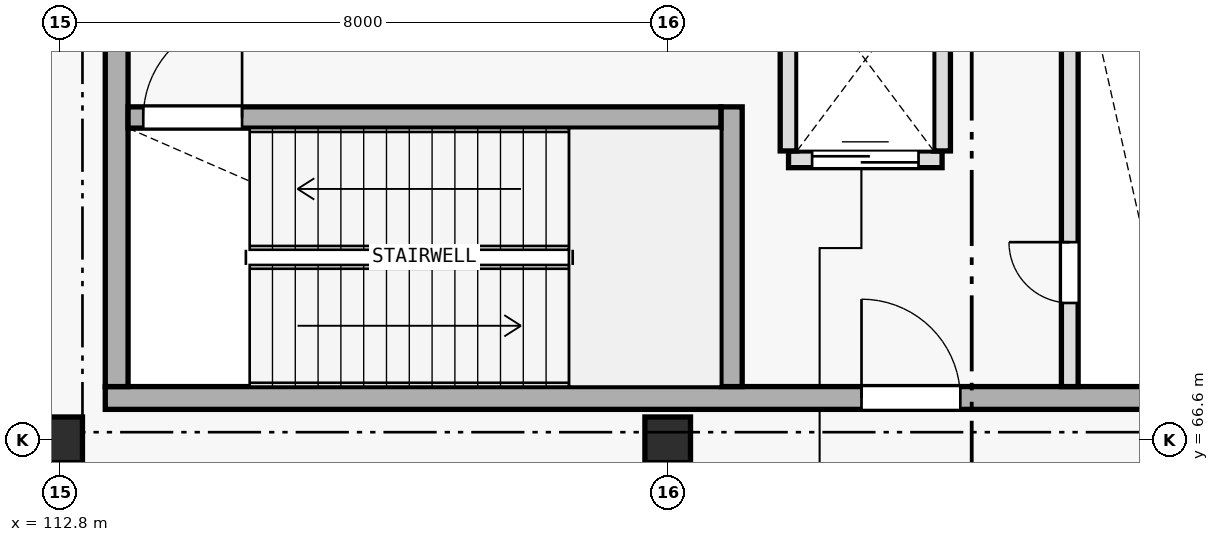
"""IFC4 building model, lengths in metres.
Left out: names, types, materials, properties, quantities, classifications, styles, units other than length and angle.
Written with IfcOpenShell. Run it as: python <this file> out.ifc"""

import sys

from ifc_helpers import new_model, si_unit, direction, frame, frame_2d, origin, origin_2d, place, context, subcontext, project, spatial, rectangle, extrude, element, fill, save


model = new_model("IFC4")
c1 = context("Model", 3, precision=1e-05, world=origin(), true_north=direction((0.0, 1.0)))
c2 = subcontext(c1, "Body", "Model", "MODEL_VIEW")
j1 = project(units=[si_unit("LENGTHUNIT", "METRE"), si_unit("PLANEANGLEUNIT", "RADIAN")], contexts=[c1])
p1 = place(None, origin())
s1 = spatial("IfcSite", under=j1, at=p1, CompositionType="ELEMENT")
p2 = place(p1, origin())
s2 = spatial("IfcBuilding", under=s1, at=p2, CompositionType="ELEMENT")
p3 = place(p2, origin())
s3 = spatial("IfcBuildingStorey", under=s2, at=p3, CompositionType="ELEMENT", Elevation=0.0)
p4 = place(p3, frame((113.4, 67.15, 0.0), z_axis=(0.0, 0.0, 1.0), x_axis=(1.0, 0.0, 0.0)))
e1 = element("IfcWall", 1, at=p4, inside=s3, PredefinedType="SHEAR", context=c2, shape_type="SweptSolid", body=[
    extrude(rectangle(XDim=14.4, YDim=0.3, at=frame_2d((7.2, 0.0))), origin(), (0.0, 0.0, 1.0), 5.395),
])
p5 = place(p4, frame((9.95, 0.0, 0.0)))
e2 = element("IfcOpeningElement", 2, at=p5, cuts=e1, PredefinedType="OPENING", context=c2, shape_type="SweptSolid", body=[
    extrude(rectangle(XDim=1.3, YDim=2.2, at=frame_2d((0.65, 1.1))), frame((0.0, 0.16, 0.0), z_axis=(0.0, -1.0, 0.0), x_axis=(1.0, 0.0, 0.0)), (0.0, 0.0, 1.0), 0.32),
])
p6 = place(p3, frame((113.55, 67.3, 0.0), z_axis=(0.0, 0.0, 1.0), x_axis=(0.0, 1.0, 0.0)))
e3 = element("IfcWall", 3, at=p6, inside=s3, PredefinedType="SHEAR", context=c2, shape_type="SweptSolid", body=[
    extrude(rectangle(XDim=5.8, YDim=0.3, at=frame_2d((2.9, 0.0))), origin(), (0.0, 0.0, 1.0), 5.395),
])
p7 = place(p3, frame((121.64, 67.3, 0.0), z_axis=(0.0, 0.0, 1.0), x_axis=(0.0, 1.0, 0.0)))
e4 = element("IfcWall", 4, at=p7, inside=s3, PredefinedType="SHEAR", context=c2, shape_type="SweptSolid", body=[
    extrude(rectangle(XDim=3.68, YDim=0.28, at=frame_2d((1.84, 0.0))), origin(), (0.0, 0.0, 1.0), 5.395),
])
p8 = place(p3, frame((113.7, 70.84, 0.0), z_axis=(0.0, 0.0, 1.0), x_axis=(1.0, 0.0, 0.0)))
e5 = element("IfcWall", 5, at=p8, inside=s3, PredefinedType="SHEAR", context=c2, shape_type="SweptSolid", body=[
    extrude(rectangle(XDim=7.8, YDim=0.28, at=frame_2d((3.9, 0.0))), origin(), (0.0, 0.0, 1.0), 5.395),
])
p9 = place(p8, frame((0.2, 0.0, 0.0)))
e6 = element("IfcOpeningElement", 6, at=p9, cuts=e5, PredefinedType="OPENING", context=c2, shape_type="SweptSolid", body=[
    extrude(rectangle(XDim=1.3, YDim=2.2, at=frame_2d((0.65, 1.1))), frame((0.0, 0.15, 0.0), z_axis=(0.0, -1.0, 0.0), x_axis=(1.0, 0.0, 0.0)), (0.0, 0.0, 1.0), 0.3),
])
for number, where, z_axis, x_axis in (
    (7, (112.8, 66.6, 0.0), (0.0, 0.0, 1.0), (1.0, 0.0, 0.0)),
    (8, (120.8, 66.6, 0.0), (0.0, 0.0, 1.0), (1.0, 0.0, 0.0)),
):
    element("IfcColumn", number, at=place(p3, frame(where, z_axis=z_axis, x_axis=x_axis)), inside=s3, PredefinedType="COLUMN", context=c2, shape_type="SweptSolid", body=[
        extrude(rectangle(XDim=0.6, YDim=0.6, at=origin_2d()), origin(), (0.0, 0.0, 1.0), 5.4),
    ])
p10 = place(p3, frame((122.39, 70.29, 0.0), z_axis=(0.0, 0.0, 1.0), x_axis=(1.0, 0.0, 0.0)))
e9 = element("IfcWall", 9, at=p10, inside=s3, PredefinedType="PLUMBINGWALL", context=c2, shape_type="SweptSolid", body=[
    extrude(rectangle(XDim=2.02, YDim=0.22, at=frame_2d((1.01, 0.0))), origin(), (0.0, 0.0, 1.0), 5.14),
])
p11 = place(p10, frame((0.31, 0.0, 0.0)))
e10 = element("IfcOpeningElement", 10, at=p11, cuts=e9, PredefinedType="OPENING", context=c2, shape_type="SweptSolid", body=[
    extrude(rectangle(XDim=1.4, YDim=2.4, at=frame_2d((0.7, 1.2))), frame((0.0, 0.12, 0.0), z_axis=(0.0, -1.0, 0.0), x_axis=(1.0, 0.0, 0.0)), (0.0, 0.0, 1.0), 0.24),
])
for number, where, z_axis, x_axis in (
    (11, (122.39, 70.4, 0.0), (0.0, 0.0, 1.0), (0.0, 1.0, 0.0)),
    (12, (124.41, 70.4, 0.0), (0.0, 0.0, 1.0), (0.0, 1.0, 0.0)),
):
    element("IfcWall", number, at=place(p3, frame(where, z_axis=z_axis, x_axis=x_axis)), inside=s3, PredefinedType="PLUMBINGWALL", context=c2, shape_type="SweptSolid", body=[
        extrude(rectangle(XDim=2.4, YDim=0.22, at=frame_2d((1.2, 0.0))), origin(), (0.0, 0.0, 1.0), 5.14),
    ])
p12 = place(p3, frame((126.09, 67.3, 0.0), z_axis=(0.0, 0.0, 1.0), x_axis=(0.0, 1.0, 0.0)))
e13 = element("IfcWall", 13, at=p12, inside=s3, PredefinedType="PLUMBINGWALL", context=c2, shape_type="SweptSolid", body=[
    extrude(rectangle(XDim=5.8, YDim=0.22, at=frame_2d((2.9, 0.0))), origin(), (0.0, 0.0, 1.0), 5.14),
])
p13 = place(p12, frame((1.1, 0.0, 0.0)))
e14 = element("IfcOpeningElement", 14, at=p13, cuts=e13, PredefinedType="OPENING", context=c2, shape_type="SweptSolid", body=[
    extrude(rectangle(XDim=0.8, YDim=2.1, at=frame_2d((0.4, 1.05))), frame((0.0, 0.12, 0.0), z_axis=(0.0, -1.0, 0.0), x_axis=(1.0, 0.0, 0.0)), (0.0, 0.0, 1.0), 0.24),
])
p14 = place(p9, origin())
e15 = element("IfcDoor", 15, at=p14, inside=s3, OperationType="SINGLE_SWING_RIGHT", PredefinedType="DOOR", context=c2, shape_type="SweptSolid", body=[
    extrude(rectangle(XDim=1.3, YDim=2.2, at=frame_2d((0.65, 1.1))), frame((0.0, 0.025, 0.0), z_axis=(0.0, -1.0, 0.0), x_axis=(1.0, 0.0, 0.0)), (0.0, 0.0, 1.0), 0.05),
])
fill(e6, e15)
p15 = place(p11, origin())
e16 = element("IfcDoor", 16, at=p15, inside=s3, OperationType="DOUBLE_DOOR_SLIDING", PredefinedType="DOOR", context=c2, shape_type="SweptSolid", body=[
    extrude(rectangle(XDim=1.4, YDim=2.4, at=frame_2d((0.7, 1.2))), frame((0.0, 0.025, 0.0), z_axis=(0.0, -1.0, 0.0), x_axis=(1.0, 0.0, 0.0)), (0.0, 0.0, 1.0), 0.05),
])
fill(e10, e16)
p16 = place(p13, origin())
e17 = element("IfcDoor", 17, at=p16, inside=s3, OperationType="SINGLE_SWING_RIGHT", PredefinedType="DOOR", context=c2, shape_type="SweptSolid", body=[
    extrude(rectangle(XDim=0.8, YDim=2.1, at=frame_2d((0.4, 1.05))), frame((0.0, 0.025, 0.0), z_axis=(0.0, -1.0, 0.0), x_axis=(1.0, 0.0, 0.0)), (0.0, 0.0, 1.0), 0.05),
])
fill(e14, e17)
p17 = place(p5, origin())
e18 = element("IfcDoor", 18, at=p17, inside=s3, OperationType="SINGLE_SWING_LEFT", PredefinedType="DOOR", context=c2, shape_type="SweptSolid", body=[
    extrude(rectangle(XDim=1.3, YDim=2.2, at=frame_2d((0.65, 1.1))), frame((0.0, 0.025, 0.0), z_axis=(0.0, -1.0, 0.0), x_axis=(1.0, 0.0, 0.0)), (0.0, 0.0, 1.0), 0.05),
])
fill(e2, e18)
save(model, sys.argv[1])
